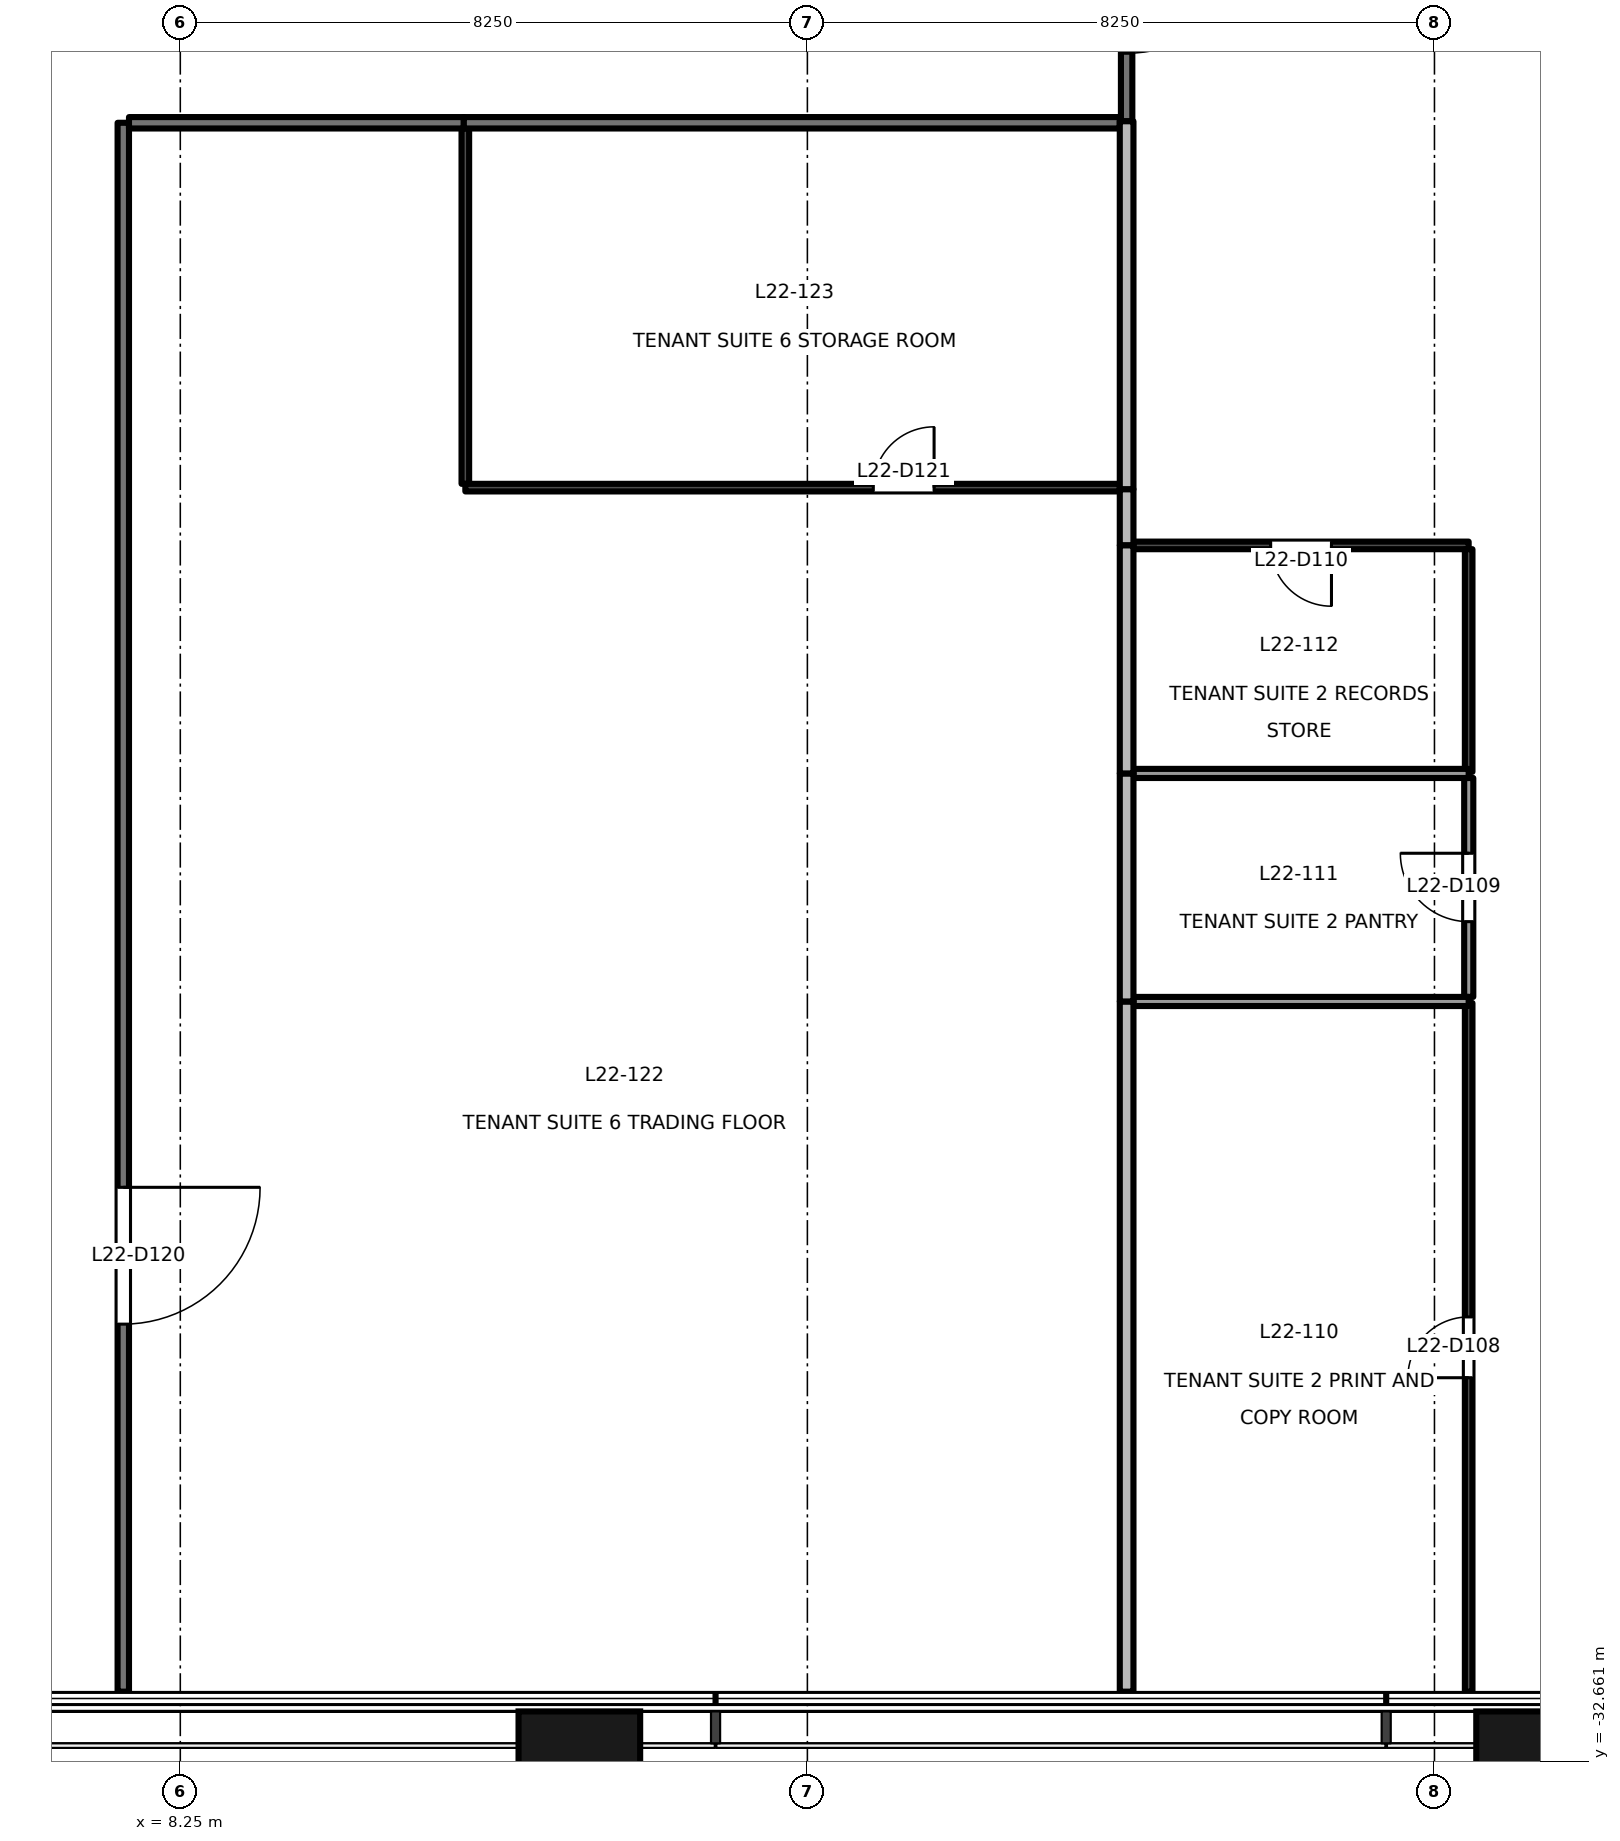
"""IFC4 building model, lengths in metres.
Left out: names, types, materials, properties, quantities, classifications, styles, units other than length and angle.
Written with IfcOpenShell. Run it as: python <this file> out.ifc"""

import sys

from ifc_helpers import new_model, si_unit, direction, frame, frame_2d, origin, origin_2d, place, context, subcontext, project, spatial, rectangle, extrude, element, fill, save


model = new_model("IFC4")
c1 = context("Model", 3, precision=1e-05, world=origin(), true_north=direction((0.0, 1.0)))
c2 = subcontext(c1, "Body", "Model", "MODEL_VIEW")
j1 = project(units=[si_unit("LENGTHUNIT", "METRE"), si_unit("PLANEANGLEUNIT", "RADIAN")], contexts=[c1])
p1 = place(None, origin())
s1 = spatial("IfcSite", under=j1, at=p1, CompositionType="ELEMENT")
p2 = place(p1, origin())
s2 = spatial("IfcBuilding", under=s1, at=p2, CompositionType="ELEMENT")
p3 = place(p2, frame((0.0, 0.0, 99.7)))
s3 = spatial("IfcBuildingStorey", under=s2, at=p3, CompositionType="ELEMENT", Elevation=99.7)
for number, where, z_axis, x_axis in (
    (1, (13.5, -32.9, -0.2), (0.0, 0.0, 1.0), (1.0, 0.0, 0.0)),
    (2, (26.1, -32.9, -0.2), (0.0, 0.0, 1.0), (1.0, 0.0, 0.0)),
):
    element("IfcColumn", number, at=place(p3, frame(where, z_axis=z_axis, x_axis=x_axis)), inside=s3, PredefinedType="COLUMN", context=c2, shape_type="SweptSolid", body=[
        extrude(rectangle(XDim=1.6, YDim=1.8, at=origin_2d()), origin(), (0.0, 0.0, 1.0), 4.0),
    ])
p4 = place(p3, frame((20.7, -7.49, 0.0), z_axis=(0.0, 0.0, 1.0), x_axis=(0.0, -1.0, 0.0)))
e3 = element("IfcWall", 3, at=p4, inside=s3, PredefinedType="PARTITIONING", context=c2, shape_type="SweptSolid", body=[
    extrude(rectangle(XDim=3.59, YDim=0.15, at=frame_2d((1.795, 0.0))), origin(), (0.0, 0.0, 1.0), 2.9),
])
p5 = place(p4, frame((0.895, 0.0, 0.0)))
e4 = element("IfcOpeningElement", 4, at=p5, cuts=e3, PredefinedType="OPENING", context=c2, shape_type="SweptSolid", body=[
    extrude(rectangle(XDim=1.8, YDim=2.1, at=frame_2d((0.9, 1.05))), frame((0.0, 0.085, 0.0), z_axis=(0.0, -1.0, 0.0), x_axis=(1.0, 0.0, 0.0)), (0.0, 0.0, 1.0), 0.171),
])
p6 = place(p3, frame((7.5, -11.1, 0.0), z_axis=(0.0, 0.0, 1.0), x_axis=(0.0, -1.0, 0.0)))
e5 = element("IfcWall", 5, at=p6, inside=s3, PredefinedType="PARTITIONING", context=c2, shape_type="SweptSolid", body=[
    extrude(rectangle(XDim=20.64, YDim=0.15, at=frame_2d((10.32, 0.0))), origin(), (0.0, 0.0, 1.0), 3.8),
])
p7 = place(p6, frame((14.005, 0.0, 0.0)))
e6 = element("IfcOpeningElement", 6, at=p7, cuts=e5, PredefinedType="OPENING", context=c2, shape_type="SweptSolid", body=[
    extrude(rectangle(XDim=1.8, YDim=2.1, at=frame_2d((0.9, 1.05))), frame((0.0, 0.085, 0.0), z_axis=(0.0, -1.0, 0.0), x_axis=(1.0, 0.0, 0.0)), (0.0, 0.0, 1.0), 0.171),
])
p8 = place(p3, frame((11.98, -11.1, 0.0), z_axis=(0.0, 0.0, 1.0), x_axis=(-1.0, 0.0, 0.0)))
e7 = element("IfcWall", 7, at=p8, inside=s3, PredefinedType="PARTITIONING", context=c2, shape_type="SweptSolid", body=[
    extrude(rectangle(XDim=4.405, YDim=0.15, at=frame_2d((2.203, 0.0))), origin(), (0.0, 0.0, 1.0), 2.8),
])
p9 = place(p3, frame((20.61, -11.1, 0.0), z_axis=(0.0, 0.0, 1.0), x_axis=(-1.0, 0.0, 0.0)))
e8 = element("IfcWall", 8, at=p9, inside=s3, PredefinedType="PARTITIONING", context=c2, shape_type="SweptSolid", body=[
    extrude(rectangle(XDim=8.63, YDim=0.15, at=frame_2d((4.315, 0.0))), origin(), (0.0, 0.0, 1.0), 2.4),
])
p10 = place(p3, frame((25.2, -31.74, 0.0), z_axis=(0.0, 0.0, 1.0), x_axis=(0.0, 1.0, 0.0)))
e9 = element("IfcWall", 9, at=p10, inside=s3, PredefinedType="PARTITIONING", context=c2, shape_type="SweptSolid", body=[
    extrude(rectangle(XDim=9.06, YDim=0.1, at=frame_2d((4.53, 0.0))), origin(), (0.0, 0.0, 1.0), 3.8),
])
p11 = place(p10, frame((4.13, 0.0, 0.0)))
e10 = element("IfcOpeningElement", 10, at=p11, cuts=e9, PredefinedType="OPENING", context=c2, shape_type="SweptSolid", body=[
    extrude(rectangle(XDim=0.8, YDim=2.1, at=frame_2d((0.4, 1.05))), frame((0.0, 0.061, 0.0), z_axis=(0.0, -1.0, 0.0), x_axis=(1.0, 0.0, 0.0)), (0.0, 0.0, 1.0), 0.121),
])
p12 = place(p3, frame((25.201, -22.6, 0.0), z_axis=(0.0, 0.0, 1.0), x_axis=(0.0, 1.0, 0.0)))
e11 = element("IfcWall", 11, at=p12, inside=s3, PredefinedType="PARTITIONING", context=c2, shape_type="SweptSolid", body=[
    extrude(rectangle(XDim=2.88, YDim=0.12, at=frame_2d((1.44, 0.0))), origin(), (0.0, 0.0, 1.0), 3.8),
])
p13 = place(p12, frame((0.99, 0.0, 0.0)))
e12 = element("IfcOpeningElement", 12, at=p13, cuts=e11, PredefinedType="OPENING", context=c2, shape_type="SweptSolid", body=[
    extrude(rectangle(XDim=0.9, YDim=2.1, at=frame_2d((0.45, 1.05))), frame((0.0, 0.071, 0.0), z_axis=(0.0, -1.0, 0.0), x_axis=(1.0, 0.0, 0.0)), (0.0, 0.0, 1.0), 0.141),
])
p14 = place(p3, frame((25.2, -16.66, 0.0), z_axis=(0.0, 0.0, 1.0), x_axis=(-1.0, 0.0, 0.0)))
e13 = element("IfcWall", 13, at=p14, inside=s3, PredefinedType="PARTITIONING", context=c2, shape_type="SweptSolid", body=[
    extrude(rectangle(XDim=4.41, YDim=0.1, at=frame_2d((2.205, 0.0))), origin(), (0.0, 0.0, 1.0), 3.8),
])
p15 = place(p14, frame((1.805, 0.0, 0.0)))
e14 = element("IfcOpeningElement", 14, at=p15, cuts=e13, PredefinedType="OPENING", context=c2, shape_type="SweptSolid", body=[
    extrude(rectangle(XDim=0.8, YDim=2.1, at=frame_2d((0.4, 1.05))), frame((0.0, 0.061, 0.0), z_axis=(0.0, -1.0, 0.0), x_axis=(1.0, 0.0, 0.0)), (0.0, 0.0, 1.0), 0.121),
])
p16 = place(p3, frame((25.2, -19.64, 0.0), z_axis=(0.0, 0.0, 1.0), x_axis=(0.0, 1.0, 0.0)))
e15 = element("IfcWall", 15, at=p16, inside=s3, PredefinedType="PARTITIONING", context=c2, shape_type="SweptSolid", body=[
    extrude(rectangle(XDim=2.93, YDim=0.1, at=frame_2d((1.465, 0.0))), origin(), (0.0, 0.0, 1.0), 3.8),
])
p17 = place(p3, frame((20.7, -16.66, 0.0), z_axis=(0.0, 0.0, 1.0), x_axis=(0.0, 1.0, 0.0)))
e16 = element("IfcWall", 16, at=p17, inside=s3, PredefinedType="PARTITIONING", context=c2, shape_type="SweptSolid", body=[
    extrude(rectangle(XDim=0.74, YDim=0.18, at=frame_2d((0.37, 0.0))), origin(), (0.0, 0.0, 1.0), 3.8),
])
p18 = place(p3, frame((20.7, -15.92, 0.0), z_axis=(0.0, 0.0, 1.0), x_axis=(0.0, 1.0, 0.0)))
e17 = element("IfcWall", 17, at=p18, inside=s3, PredefinedType="PARTITIONING", context=c2, shape_type="SweptSolid", body=[
    extrude(rectangle(XDim=4.84, YDim=0.18, at=frame_2d((2.42, 0.0))), origin(), (0.0, 0.0, 1.0), 2.9),
])
p19 = place(p3, frame((20.79, -22.66, 0.0), z_axis=(0.0, 0.0, 1.0), x_axis=(1.0, 0.0, 0.0)))
e18 = element("IfcWall", 18, at=p19, inside=s3, PredefinedType="PARTITIONING", context=c2, shape_type="SweptSolid", body=[
    extrude(rectangle(XDim=4.41, YDim=0.12, at=frame_2d((2.205, 0.0))), origin(), (0.0, 0.0, 1.0), 3.8),
])
p20 = place(p3, frame((20.7, -31.74, 0.0), z_axis=(0.0, 0.0, 1.0), x_axis=(0.0, 1.0, 0.0)))
e19 = element("IfcWall", 19, at=p20, inside=s3, PredefinedType="PARTITIONING", context=c2, shape_type="SweptSolid", body=[
    extrude(rectangle(XDim=9.08, YDim=0.18, at=frame_2d((4.54, 0.0))), origin(), (0.0, 0.0, 1.0), 3.8),
])
p21 = place(p3, frame((20.79, -19.66, 0.0), z_axis=(0.0, 0.0, 1.0), x_axis=(1.0, 0.0, 0.0)))
e20 = element("IfcWall", 20, at=p21, inside=s3, PredefinedType="PARTITIONING", context=c2, shape_type="SweptSolid", body=[
    extrude(rectangle(XDim=4.41, YDim=0.12, at=frame_2d((2.205, 0.0))), origin(), (0.0, 0.0, 1.0), 3.8),
])
for number, where, z_axis, x_axis in (
    (21, (20.7, -22.66, 0.0), (0.0, 0.0, 1.0), (0.0, 1.0, 0.0)),
    (22, (20.7, -19.66, 0.0), (0.0, 0.0, 1.0), (0.0, 1.0, 0.0)),
):
    element("IfcWall", number, at=place(p3, frame(where, z_axis=z_axis, x_axis=x_axis)), inside=s3, PredefinedType="PARTITIONING", context=c2, shape_type="SweptSolid", body=[
        extrude(rectangle(XDim=3.0, YDim=0.18, at=frame_2d((1.5, 0.0))), origin(), (0.0, 0.0, 1.0), 3.8),
    ])
p22 = place(p3, frame((12.0, -11.175, 0.0), z_axis=(0.0, 0.0, 1.0), x_axis=(0.0, -1.0, 0.0)))
e23 = element("IfcWall", 23, at=p22, inside=s3, PredefinedType="PARTITIONING", context=c2, shape_type="SweptSolid", body=[
    extrude(rectangle(XDim=4.675, YDim=0.1, at=frame_2d((2.337, 0.0))), origin(), (0.0, 0.0, 1.0), 3.8),
])
p23 = place(p3, frame((12.0, -15.9, 0.0), z_axis=(0.0, 0.0, 1.0), x_axis=(1.0, 0.0, 0.0)))
e24 = element("IfcWall", 24, at=p23, inside=s3, PredefinedType="PARTITIONING", context=c2, shape_type="SweptSolid", body=[
    extrude(rectangle(XDim=8.61, YDim=0.1, at=frame_2d((4.305, 0.0))), origin(), (0.0, 0.0, 1.0), 2.4),
])
p24 = place(p23, frame((5.367, 0.0, 0.0)))
e25 = element("IfcOpeningElement", 25, at=p24, cuts=e24, PredefinedType="OPENING", context=c2, shape_type="SweptSolid", body=[
    extrude(rectangle(XDim=0.8, YDim=2.1, at=frame_2d((0.4, 1.05))), frame((0.0, 0.061, 0.0), z_axis=(0.0, -1.0, 0.0), x_axis=(1.0, 0.0, 0.0)), (0.0, 0.0, 1.0), 0.121),
])
p25 = place(p5, origin())
e26 = element("IfcDoor", 26, at=p25, inside=s3, OperationType="DOUBLE_DOOR_SINGLE_SWING", PredefinedType="DOOR", context=c2, shape_type="SweptSolid", body=[
    extrude(rectangle(XDim=1.8, YDim=2.1, at=frame_2d((0.9, 1.05))), frame((0.0, 0.025, 0.0), z_axis=(0.0, -1.0, 0.0), x_axis=(1.0, 0.0, 0.0)), (0.0, 0.0, 1.0), 0.05),
])
fill(e4, e26)
p26 = place(p11, origin())
e27 = element("IfcDoor", 27, at=p26, inside=s3, OperationType="SINGLE_SWING_LEFT", PredefinedType="DOOR", context=c2, shape_type="SweptSolid", body=[
    extrude(rectangle(XDim=0.8, YDim=2.1, at=frame_2d((0.4, 1.05))), frame((0.0, 0.025, 0.0), z_axis=(0.0, -1.0, 0.0), x_axis=(1.0, 0.0, 0.0)), (0.0, 0.0, 1.0), 0.05),
])
fill(e10, e27)
p27 = place(p13, origin())
e28 = element("IfcDoor", 28, at=p27, inside=s3, OperationType="SINGLE_SWING_RIGHT", PredefinedType="DOOR", context=c2, shape_type="SweptSolid", body=[
    extrude(rectangle(XDim=0.9, YDim=2.1, at=frame_2d((0.45, 1.05))), frame((0.0, 0.025, 0.0), z_axis=(0.0, -1.0, 0.0), x_axis=(1.0, 0.0, 0.0)), (0.0, 0.0, 1.0), 0.05),
])
fill(e12, e28)
p28 = place(p15, origin())
e29 = element("IfcDoor", 29, at=p28, inside=s3, OperationType="SINGLE_SWING_LEFT", PredefinedType="DOOR", context=c2, shape_type="SweptSolid", body=[
    extrude(rectangle(XDim=0.8, YDim=2.1, at=frame_2d((0.4, 1.05))), frame((0.0, 0.025, 0.0), z_axis=(0.0, -1.0, 0.0), x_axis=(1.0, 0.0, 0.0)), (0.0, 0.0, 1.0), 0.05),
])
fill(e14, e29)
p29 = place(p7, origin())
e30 = element("IfcDoor", 30, at=p29, inside=s3, OperationType="DOUBLE_DOOR_SINGLE_SWING", PredefinedType="DOOR", context=c2, shape_type="SweptSolid", body=[
    extrude(rectangle(XDim=1.8, YDim=2.1, at=frame_2d((0.9, 1.05))), frame((0.0, 0.025, 0.0), z_axis=(0.0, -1.0, 0.0), x_axis=(1.0, 0.0, 0.0)), (0.0, 0.0, 1.0), 0.05),
])
fill(e6, e30)
p30 = place(p24, origin())
e31 = element("IfcDoor", 31, at=p30, inside=s3, OperationType="SINGLE_SWING_RIGHT", PredefinedType="DOOR", context=c2, shape_type="SweptSolid", body=[
    extrude(rectangle(XDim=0.8, YDim=2.1, at=frame_2d((0.4, 1.05))), frame((0.0, 0.025, 0.0), z_axis=(0.0, -1.0, 0.0), x_axis=(1.0, 0.0, 0.0)), (0.0, 0.0, 1.0), 0.05),
])
fill(e25, e31)
save(model, sys.argv[1])
